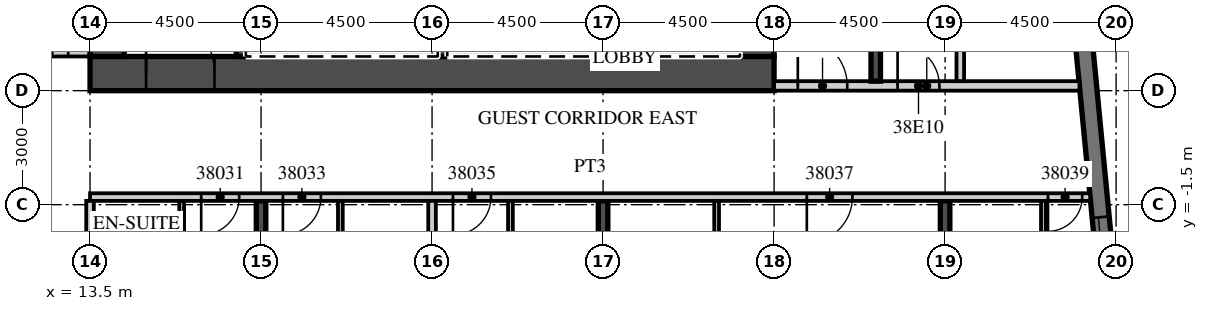
"""IFC4 building model, lengths in metres.
Left out: names, types, materials, properties, quantities, classifications, styles, units other than length and angle.
Written with IfcOpenShell. Run it as: python <this file> out.ifc"""

import sys

from ifc_helpers import new_model, si_unit, direction, frame, frame_2d, origin, place, context, subcontext, project, spatial, rectangle, extrude, element, fill, save


model = new_model("IFC4")
c1 = context("Model", 3, precision=1e-05, world=origin(), true_north=direction((0.0, 1.0)))
c2 = subcontext(c1, "Body", "Model", "MODEL_VIEW")
j1 = project(units=[si_unit("LENGTHUNIT", "METRE"), si_unit("PLANEANGLEUNIT", "RADIAN")], contexts=[c1])
p1 = place(None, origin())
s1 = spatial("IfcSite", under=j1, at=p1, CompositionType="ELEMENT")
p2 = place(p1, origin())
s2 = spatial("IfcBuilding", under=s1, at=p2, CompositionType="ELEMENT")
p3 = place(p2, frame((0.0, 0.0, 166.9)))
s3 = spatial("IfcBuildingStorey", under=s2, at=p3, CompositionType="ELEMENT", Elevation=166.9)
p4 = place(p3, frame((18.0, -19.245, 0.0), z_axis=(0.0, 0.0, 1.0), x_axis=(0.0, 1.0, 0.0)))
e1 = element("IfcWall", 1, at=p4, inside=s3, PredefinedType="SHEAR", context=c2, shape_type="SweptSolid", body=[
    extrude(rectangle(XDim=17.845, YDim=0.25, at=frame_2d((8.923, 0.0))), origin(), (0.0, 0.0, 1.0), 3.3),
])
p5 = place(p3, frame((27.0, -18.379, 0.0), z_axis=(0.0, 0.0, 1.0), x_axis=(0.0, 1.0, 0.0)))
e2 = element("IfcWall", 2, at=p5, inside=s3, PredefinedType="SHEAR", context=c2, shape_type="SweptSolid", body=[
    extrude(rectangle(XDim=16.979, YDim=0.25, at=frame_2d((8.489, 0.0))), origin(), (0.0, 0.0, 1.0), 3.3),
])
p6 = place(p3, frame((36.0, -17.512, 0.0), z_axis=(0.0, 0.0, 1.0), x_axis=(0.0, 1.0, 0.0)))
e3 = element("IfcWall", 3, at=p6, inside=s3, PredefinedType="SHEAR", context=c2, shape_type="SweptSolid", body=[
    extrude(rectangle(XDim=16.112, YDim=0.25, at=frame_2d((8.056, 0.0))), origin(), (0.0, 0.0, 1.0), 3.3),
])
p7 = place(p3, frame((41.214, -13.466, 0.0), z_axis=(0.0, 0.0, 1.0), x_axis=(-0.095847314626, 0.995396047952, 0.0)))
e4 = element("IfcWall", 4, at=p7, inside=s3, PredefinedType="SOLIDWALL", context=c2, shape_type="SweptSolid", body=[
    extrude(rectangle(XDim=34.0, YDim=0.45, at=frame_2d((17.0, 0.0))), origin(), (0.0, 0.0, 1.0), 3.02),
])
p8 = place(p7, frame((3.869, 0.0, 0.45)))
e5 = element("IfcOpeningElement", 5, at=p8, cuts=e4, PredefinedType="OPENING", context=c2, shape_type="SweptSolid", body=[
    extrude(rectangle(XDim=3.3, YDim=2.25, at=frame_2d((1.65, 1.125))), frame((0.0, 0.235, 0.0), z_axis=(0.0, -1.0, 0.0), x_axis=(1.0, 0.0, 0.0)), (0.0, 0.0, 1.0), 0.47),
])
p9 = place(p7, frame((8.39, 0.0, 0.45)))
e6 = element("IfcOpeningElement", 6, at=p9, cuts=e4, PredefinedType="OPENING", context=c2, shape_type="SweptSolid", body=[
    extrude(rectangle(XDim=3.3, YDim=2.25, at=frame_2d((1.65, 1.125))), frame((0.0, 0.235, 0.0), z_axis=(0.0, -1.0, 0.0), x_axis=(1.0, 0.0, 0.0)), (0.0, 0.0, 1.0), 0.47),
])
p10 = place(p3, frame((-13.5, 2.5, 0.0), z_axis=(0.0, 0.0, 1.0), x_axis=(1.0, 0.0, 0.0)))
e7 = element("IfcWall", 7, at=p10, inside=s3, PredefinedType="PARTITIONING", context=c2, shape_type="SweptSolid", body=[
    extrude(rectangle(XDim=27.0, YDim=0.2, at=frame_2d((13.5, 0.0))), origin(), (0.0, 0.0, 1.0), 3.02),
])
p11 = place(p10, frame((0.575, 0.0, 0.0)))
e8 = element("IfcOpeningElement", 8, at=p11, cuts=e7, PredefinedType="OPENING", context=c2, shape_type="SweptSolid", body=[
    extrude(rectangle(XDim=1.0, YDim=2.1, at=frame_2d((0.5, 1.05))), frame((0.0, 0.11, 0.0), z_axis=(0.0, -1.0, 0.0), x_axis=(1.0, 0.0, 0.0)), (0.0, 0.0, 1.0), 0.22),
])
p12 = place(p10, frame((7.45, 0.0, 0.0)))
e9 = element("IfcOpeningElement", 9, at=p12, cuts=e7, PredefinedType="OPENING", context=c2, shape_type="SweptSolid", body=[
    extrude(rectangle(XDim=1.0, YDim=2.1, at=frame_2d((0.5, 1.05))), frame((0.0, 0.11, 0.0), z_axis=(0.0, -1.0, 0.0), x_axis=(1.0, 0.0, 0.0)), (0.0, 0.0, 1.0), 0.22),
])
p13 = place(p10, frame((11.925, 0.0, 0.0)))
e10 = element("IfcOpeningElement", 10, at=p13, cuts=e7, PredefinedType="OPENING", context=c2, shape_type="SweptSolid", body=[
    extrude(rectangle(XDim=1.0, YDim=2.1, at=frame_2d((0.5, 1.05))), frame((0.0, 0.11, 0.0), z_axis=(0.0, -1.0, 0.0), x_axis=(1.0, 0.0, 0.0)), (0.0, 0.0, 1.0), 0.22),
])
p14 = place(p10, frame((15.938, 0.0, 0.0)))
e11 = element("IfcOpeningElement", 11, at=p14, cuts=e7, PredefinedType="OPENING", context=c2, shape_type="SweptSolid", body=[
    extrude(rectangle(XDim=1.2, YDim=2.1, at=frame_2d((0.6, 1.05))), frame((0.0, 0.11, 0.0), z_axis=(0.0, -1.0, 0.0), x_axis=(1.0, 0.0, 0.0)), (0.0, 0.0, 1.0), 0.22),
])
p15 = place(p10, frame((25.425, 0.0, 0.0)))
e12 = element("IfcOpeningElement", 12, at=p15, cuts=e7, PredefinedType="OPENING", context=c2, shape_type="SweptSolid", body=[
    extrude(rectangle(XDim=1.0, YDim=2.1, at=frame_2d((0.5, 1.05))), frame((0.0, 0.11, 0.0), z_axis=(0.0, -1.0, 0.0), x_axis=(1.0, 0.0, 0.0)), (0.0, 0.0, 1.0), 0.22),
])
p16 = place(p3, frame((13.5, -1.3, 0.0), z_axis=(0.0, 0.0, 1.0), x_axis=(1.0, 0.0, 0.0)))
e13 = element("IfcWall", 13, at=p16, inside=s3, PredefinedType="PARTITIONING", context=c2, shape_type="SweptSolid", body=[
    extrude(rectangle(XDim=26.317, YDim=0.2, at=frame_2d((13.158, 0.0))), origin(), (0.0, 0.0, 1.0), 3.02),
])
p17 = place(p16, frame((2.925, 0.0, 0.0)))
e14 = element("IfcOpeningElement", 14, at=p17, cuts=e13, PredefinedType="OPENING", context=c2, shape_type="SweptSolid", body=[
    extrude(rectangle(XDim=1.0, YDim=2.1, at=frame_2d((0.5, 1.05))), frame((0.0, 0.11, 0.0), z_axis=(0.0, -1.0, 0.0), x_axis=(1.0, 0.0, 0.0)), (0.0, 0.0, 1.0), 0.22),
])
p18 = place(p16, frame((5.075, 0.0, 0.0)))
e15 = element("IfcOpeningElement", 15, at=p18, cuts=e13, PredefinedType="OPENING", context=c2, shape_type="SweptSolid", body=[
    extrude(rectangle(XDim=1.0, YDim=2.1, at=frame_2d((0.5, 1.05))), frame((0.0, 0.11, 0.0), z_axis=(0.0, -1.0, 0.0), x_axis=(1.0, 0.0, 0.0)), (0.0, 0.0, 1.0), 0.22),
])
p19 = place(p16, frame((9.55, 0.0, 0.0)))
e16 = element("IfcOpeningElement", 16, at=p19, cuts=e13, PredefinedType="OPENING", context=c2, shape_type="SweptSolid", body=[
    extrude(rectangle(XDim=1.0, YDim=2.1, at=frame_2d((0.5, 1.05))), frame((0.0, 0.11, 0.0), z_axis=(0.0, -1.0, 0.0), x_axis=(1.0, 0.0, 0.0)), (0.0, 0.0, 1.0), 0.22),
])
p20 = place(p16, frame((18.862, 0.0, 0.0)))
e17 = element("IfcOpeningElement", 17, at=p20, cuts=e13, PredefinedType="OPENING", context=c2, shape_type="SweptSolid", body=[
    extrude(rectangle(XDim=1.2, YDim=2.1, at=frame_2d((0.6, 1.05))), frame((0.0, 0.11, 0.0), z_axis=(0.0, -1.0, 0.0), x_axis=(1.0, 0.0, 0.0)), (0.0, 0.0, 1.0), 0.22),
])
p21 = place(p16, frame((25.208, 0.0, 0.0)))
e18 = element("IfcOpeningElement", 18, at=p21, cuts=e13, PredefinedType="OPENING", context=c2, shape_type="SweptSolid", body=[
    extrude(rectangle(XDim=0.9, YDim=2.1, at=frame_2d((0.45, 1.05))), frame((0.0, 0.11, 0.0), z_axis=(0.0, -1.0, 0.0), x_axis=(1.0, 0.0, 0.0)), (0.0, 0.0, 1.0), 0.22),
])
p22 = place(p3, frame((13.5, -19.701, 0.0), z_axis=(0.0, 0.0, 1.0), x_axis=(0.0, 1.0, 0.0)))
e19 = element("IfcWall", 19, at=p22, inside=s3, PredefinedType="PARTITIONING", context=c2, shape_type="SweptSolid", body=[
    extrude(rectangle(XDim=18.301, YDim=0.2, at=frame_2d((9.15, 0.0))), origin(), (0.0, 0.0, 1.0), 3.02),
])
p23 = place(p3, frame((15.912, -7.125, 0.0), z_axis=(0.0, 0.0, 1.0), x_axis=(0.0, 1.0, 0.0)))
e20 = element("IfcWall", 20, at=p23, inside=s3, PredefinedType="PARTITIONING", context=c2, shape_type="SweptSolid", body=[
    extrude(rectangle(XDim=5.725, YDim=0.125, at=frame_2d((2.863, 0.0))), origin(), (0.0, 0.0, 1.0), 3.02),
])
p24 = place(p23, frame((2.375, 0.0, 0.0)))
e21 = element("IfcOpeningElement", 21, at=p24, cuts=e20, PredefinedType="OPENING", context=c2, shape_type="SweptSolid", body=[
    extrude(rectangle(XDim=0.9, YDim=2.1, at=frame_2d((0.45, 1.05))), frame((0.0, 0.073, 0.0), z_axis=(0.0, -1.0, 0.0), x_axis=(1.0, 0.0, 0.0)), (0.0, 0.0, 1.0), 0.145),
])
p25 = place(p3, frame((22.5, -18.834, 0.0), z_axis=(0.0, 0.0, 1.0), x_axis=(0.0, 1.0, 0.0)))
e22 = element("IfcWall", 22, at=p25, inside=s3, PredefinedType="PARTITIONING", context=c2, shape_type="SweptSolid", body=[
    extrude(rectangle(XDim=17.434, YDim=0.2, at=frame_2d((8.717, 0.0))), origin(), (0.0, 0.0, 1.0), 3.02),
])
p26 = place(p3, frame((20.087, -7.125, 0.0), z_axis=(0.0, 0.0, 1.0), x_axis=(0.0, 1.0, 0.0)))
e23 = element("IfcWall", 23, at=p26, inside=s3, PredefinedType="PARTITIONING", context=c2, shape_type="SweptSolid", body=[
    extrude(rectangle(XDim=5.725, YDim=0.125, at=frame_2d((2.863, 0.0))), origin(), (0.0, 0.0, 1.0), 3.02),
])
p27 = place(p26, frame((2.375, 0.0, 0.0)))
e24 = element("IfcOpeningElement", 24, at=p27, cuts=e23, PredefinedType="OPENING", context=c2, shape_type="SweptSolid", body=[
    extrude(rectangle(XDim=0.9, YDim=2.1, at=frame_2d((0.45, 1.05))), frame((0.0, 0.073, 0.0), z_axis=(0.0, -1.0, 0.0), x_axis=(1.0, 0.0, 0.0)), (0.0, 0.0, 1.0), 0.145),
])
p28 = place(p3, frame((24.562, -7.125, 0.0), z_axis=(0.0, 0.0, 1.0), x_axis=(0.0, 1.0, 0.0)))
e25 = element("IfcWall", 25, at=p28, inside=s3, PredefinedType="PARTITIONING", context=c2, shape_type="SweptSolid", body=[
    extrude(rectangle(XDim=5.725, YDim=0.125, at=frame_2d((2.863, 0.0))), origin(), (0.0, 0.0, 1.0), 3.02),
])
p29 = place(p28, frame((2.375, 0.0, 0.0)))
e26 = element("IfcOpeningElement", 26, at=p29, cuts=e25, PredefinedType="OPENING", context=c2, shape_type="SweptSolid", body=[
    extrude(rectangle(XDim=0.9, YDim=2.1, at=frame_2d((0.45, 1.05))), frame((0.0, 0.073, 0.0), z_axis=(0.0, -1.0, 0.0), x_axis=(1.0, 0.0, 0.0)), (0.0, 0.0, 1.0), 0.145),
])
p30 = place(p3, frame((29.988, -7.125, 0.0), z_axis=(0.0, 0.0, 1.0), x_axis=(0.0, 1.0, 0.0)))
e27 = element("IfcWall", 27, at=p30, inside=s3, PredefinedType="PARTITIONING", context=c2, shape_type="SweptSolid", body=[
    extrude(rectangle(XDim=5.725, YDim=0.125, at=frame_2d((2.863, 0.0))), origin(), (0.0, 0.0, 1.0), 3.02),
])
p31 = place(p30, frame((2.375, 0.0, 0.0)))
e28 = element("IfcOpeningElement", 28, at=p31, cuts=e27, PredefinedType="OPENING", context=c2, shape_type="SweptSolid", body=[
    extrude(rectangle(XDim=0.9, YDim=2.1, at=frame_2d((0.45, 1.05))), frame((0.0, 0.073, 0.0), z_axis=(0.0, -1.0, 0.0), x_axis=(1.0, 0.0, 0.0)), (0.0, 0.0, 1.0), 0.145),
])
p32 = place(p3, frame((38.587, -6.445, 0.0), z_axis=(0.0, 0.0, 1.0), x_axis=(0.0, 1.0, 0.0)))
e29 = element("IfcWall", 29, at=p32, inside=s3, PredefinedType="PARTITIONING", context=c2, shape_type="SweptSolid", body=[
    extrude(rectangle(XDim=5.045, YDim=0.125, at=frame_2d((2.522, 0.0))), origin(), (0.0, 0.0, 1.0), 3.02),
])
p33 = place(p32, frame((1.695, 0.0, 0.0)))
e30 = element("IfcOpeningElement", 30, at=p33, cuts=e29, PredefinedType="OPENING", context=c2, shape_type="SweptSolid", body=[
    extrude(rectangle(XDim=0.9, YDim=2.1, at=frame_2d((0.45, 1.05))), frame((0.0, 0.073, 0.0), z_axis=(0.0, -1.0, 0.0), x_axis=(1.0, 0.0, 0.0)), (0.0, 0.0, 1.0), 0.145),
])
p34 = place(p3, frame((13.5, 1.95, 0.0), z_axis=(0.0, 0.0, 1.0), x_axis=(1.0, 0.0, 0.0)))
e31 = element("IfcWall", 31, at=p34, inside=s3, PredefinedType="SHEAR", context=c2, shape_type="SweptSolid", body=[
    extrude(rectangle(XDim=18.0, YDim=0.9, at=frame_2d((9.0, 0.0))), origin(), (0.0, 0.0, 1.0), 3.02),
])
p35 = place(p34, frame((1.475, 0.0, 0.0)))
e32 = element("IfcOpeningElement", 32, at=p35, cuts=e31, PredefinedType="OPENING", context=c2, shape_type="SweptSolid", body=[
    extrude(rectangle(XDim=1.8, YDim=2.1, at=frame_2d((0.9, 1.05))), frame((0.0, 0.46, 0.0), z_axis=(0.0, -1.0, 0.0), x_axis=(1.0, 0.0, 0.0)), (0.0, 0.0, 1.0), 0.92),
])
p36 = place(p3, frame((31.05, 2.4, 0.0), z_axis=(0.0, 0.0, 1.0), x_axis=(0.0, 1.0, 0.0)))
e33 = element("IfcWall", 33, at=p36, inside=s3, PredefinedType="SHEAR", context=c2, shape_type="SweptSolid", body=[
    extrude(rectangle(XDim=12.8, YDim=0.9, at=frame_2d((6.4, 0.0))), origin(), (0.0, 0.0, 1.0), 3.02),
])
p37 = place(p36, frame((0.2, 0.0, 0.0)))
e34 = element("IfcOpeningElement", 34, at=p37, cuts=e33, PredefinedType="OPENING", context=c2, shape_type="SweptSolid", body=[
    extrude(rectangle(XDim=1.1, YDim=2.1, at=frame_2d((0.55, 1.05))), frame((0.0, 0.46, 0.0), z_axis=(0.0, -1.0, 0.0), x_axis=(1.0, 0.0, 0.0)), (0.0, 0.0, 1.0), 0.92),
])
p38 = place(p3, frame((13.95, 2.4, 0.0), z_axis=(0.0, 0.0, 1.0), x_axis=(0.0, 1.0, 0.0)))
e35 = element("IfcWall", 35, at=p38, inside=s3, PredefinedType="SHEAR", context=c2, shape_type="SweptSolid", body=[
    extrude(rectangle(XDim=12.2, YDim=0.9, at=frame_2d((6.1, 0.0))), origin(), (0.0, 0.0, 1.0), 3.02),
])
p39 = place(p3, frame((17.475, 2.4, 0.0), z_axis=(0.0, 0.0, 1.0), x_axis=(0.0, 1.0, 0.0)))
e36 = element("IfcWall", 36, at=p39, inside=s3, PredefinedType="SHEAR", context=c2, shape_type="SweptSolid", body=[
    extrude(rectangle(XDim=3.15, YDim=0.25, at=frame_2d((1.575, 0.0))), origin(), (0.0, 0.0, 1.0), 3.02),
])
for number, where, z_axis, x_axis in (
    (37, (27.975, 2.4, 0.0), (0.0, 0.0, 1.0), (0.0, 1.0, 0.0)),
    (38, (22.775, 2.4, 0.0), (0.0, 0.0, 1.0), (0.0, 1.0, 0.0)),
):
    element("IfcWall", number, at=place(p3, frame(where, z_axis=z_axis, x_axis=x_axis)), inside=s3, PredefinedType="SHEAR", context=c2, shape_type="SweptSolid", body=[
        extrude(rectangle(XDim=2.9, YDim=0.25, at=frame_2d((1.45, 0.0))), origin(), (0.0, 0.0, 1.0), 3.02),
    ])
p40 = place(p3, frame((31.5, 1.625, 0.0), z_axis=(0.0, 0.0, 1.0), x_axis=(1.0, 0.0, 0.0)))
e39 = element("IfcWall", 39, at=p40, inside=s3, PredefinedType="PARTITIONING", context=c2, shape_type="SweptSolid", body=[
    extrude(rectangle(XDim=8.035, YDim=0.25, at=frame_2d((4.018, 0.0))), origin(), (0.0, 0.0, 1.0), 3.02),
])
p41 = place(p40, frame((0.625, 0.0, 0.0)))
e40 = element("IfcOpeningElement", 40, at=p41, cuts=e39, PredefinedType="OPENING", context=c2, shape_type="SweptSolid", body=[
    extrude(rectangle(XDim=1.3, YDim=2.1, at=frame_2d((0.65, 1.05))), frame((0.0, 0.135, 0.0), z_axis=(0.0, -1.0, 0.0), x_axis=(1.0, 0.0, 0.0)), (0.0, 0.0, 1.0), 0.27),
])
p42 = place(p40, frame((3.25, 0.0, 0.0)))
e41 = element("IfcOpeningElement", 41, at=p42, cuts=e39, PredefinedType="OPENING", context=c2, shape_type="SweptSolid", body=[
    extrude(rectangle(XDim=1.1, YDim=2.1, at=frame_2d((0.55, 1.05))), frame((0.0, 0.135, 0.0), z_axis=(0.0, -1.0, 0.0), x_axis=(1.0, 0.0, 0.0)), (0.0, 0.0, 1.0), 0.27),
])
p43 = place(p3, frame((34.175, 1.75, 0.0), z_axis=(0.0, 0.0, 1.0), x_axis=(0.0, 1.0, 0.0)))
e42 = element("IfcWall", 42, at=p43, inside=s3, PredefinedType="SHEAR", context=c2, shape_type="SweptSolid", body=[
    extrude(rectangle(XDim=8.35, YDim=0.25, at=frame_2d((4.175, 0.0))), origin(), (0.0, 0.0, 1.0), 3.02),
])
p44 = place(p3, frame((36.4, 1.75, 0.0), z_axis=(0.0, 0.0, 1.0), x_axis=(0.0, 1.0, 0.0)))
e43 = element("IfcWall", 43, at=p44, inside=s3, PredefinedType="PARTITIONING", context=c2, shape_type="SweptSolid", body=[
    extrude(rectangle(XDim=15.95, YDim=0.2, at=frame_2d((7.975, 0.0))), origin(), (0.0, 0.0, 1.0), 3.02),
])
p45 = place(p44, frame((14.7, 0.0, 0.0)))
e44 = element("IfcOpeningElement", 44, at=p45, cuts=e43, PredefinedType="OPENING", context=c2, shape_type="SweptSolid", body=[
    extrude(rectangle(XDim=0.9, YDim=2.1, at=frame_2d((0.45, 1.05))), frame((0.0, 0.11, 0.0), z_axis=(0.0, -1.0, 0.0), x_axis=(1.0, 0.0, 0.0)), (0.0, 0.0, 1.0), 0.22),
])
p46 = place(p9, origin())
e45 = element("IfcWindow", 45, at=p46, inside=s3, PartitioningType="SINGLE_PANEL", PredefinedType="WINDOW", context=c2, shape_type="SweptSolid", body=[
    extrude(rectangle(XDim=3.3, YDim=2.25, at=frame_2d((1.65, 1.125))), frame((0.0, 0.09, 0.0), z_axis=(0.0, -1.0, 0.0), x_axis=(1.0, 0.0, 0.0)), (0.0, 0.0, 1.0), 0.06),
])
fill(e6, e45)
p47 = place(p15, origin())
e46 = element("IfcDoor", 46, at=p47, inside=s3, OperationType="SINGLE_SWING_LEFT", PredefinedType="DOOR", context=c2, shape_type="SweptSolid", body=[
    extrude(rectangle(XDim=1.0, YDim=2.1, at=frame_2d((0.5, 1.05))), frame((0.0, 0.025, 0.0), z_axis=(0.0, -1.0, 0.0), x_axis=(1.0, 0.0, 0.0)), (0.0, 0.0, 1.0), 0.05),
])
fill(e12, e46)
p48 = place(p17, origin())
e47 = element("IfcDoor", 47, at=p48, inside=s3, OperationType="SINGLE_SWING_LEFT", PredefinedType="DOOR", context=c2, shape_type="SweptSolid", body=[
    extrude(rectangle(XDim=1.0, YDim=2.1, at=frame_2d((0.5, 1.05))), frame((0.0, 0.025, 0.0), z_axis=(0.0, -1.0, 0.0), x_axis=(1.0, 0.0, 0.0)), (0.0, 0.0, 1.0), 0.05),
])
fill(e14, e47)
p49 = place(p18, origin())
e48 = element("IfcDoor", 48, at=p49, inside=s3, OperationType="SINGLE_SWING_LEFT", PredefinedType="DOOR", context=c2, shape_type="SweptSolid", body=[
    extrude(rectangle(XDim=1.0, YDim=2.1, at=frame_2d((0.5, 1.05))), frame((0.0, 0.025, 0.0), z_axis=(0.0, -1.0, 0.0), x_axis=(1.0, 0.0, 0.0)), (0.0, 0.0, 1.0), 0.05),
])
fill(e15, e48)
p50 = place(p19, origin())
e49 = element("IfcDoor", 49, at=p50, inside=s3, OperationType="SINGLE_SWING_LEFT", PredefinedType="DOOR", context=c2, shape_type="SweptSolid", body=[
    extrude(rectangle(XDim=1.0, YDim=2.1, at=frame_2d((0.5, 1.05))), frame((0.0, 0.025, 0.0), z_axis=(0.0, -1.0, 0.0), x_axis=(1.0, 0.0, 0.0)), (0.0, 0.0, 1.0), 0.05),
])
fill(e16, e49)
p51 = place(p20, origin())
e50 = element("IfcDoor", 50, at=p51, inside=s3, OperationType="SINGLE_SWING_LEFT", PredefinedType="DOOR", context=c2, shape_type="SweptSolid", body=[
    extrude(rectangle(XDim=1.2, YDim=2.1, at=frame_2d((0.6, 1.05))), frame((0.0, 0.025, 0.0), z_axis=(0.0, -1.0, 0.0), x_axis=(1.0, 0.0, 0.0)), (0.0, 0.0, 1.0), 0.05),
])
fill(e17, e50)
p52 = place(p21, origin())
e51 = element("IfcDoor", 51, at=p52, inside=s3, OperationType="SINGLE_SWING_LEFT", PredefinedType="DOOR", context=c2, shape_type="SweptSolid", body=[
    extrude(rectangle(XDim=0.9, YDim=2.1, at=frame_2d((0.45, 1.05))), frame((0.0, 0.025, 0.0), z_axis=(0.0, -1.0, 0.0), x_axis=(1.0, 0.0, 0.0)), (0.0, 0.0, 1.0), 0.05),
])
fill(e18, e51)
p53 = place(p35, origin())
e52 = element("IfcDoor", 52, at=p53, inside=s3, OperationType="DOUBLE_DOOR_DOUBLE_SWING", PredefinedType="DOOR", context=c2, shape_type="SweptSolid", body=[
    extrude(rectangle(XDim=1.8, YDim=2.1, at=frame_2d((0.9, 1.05))), frame((0.0, 0.025, 0.0), z_axis=(0.0, -1.0, 0.0), x_axis=(1.0, 0.0, 0.0)), (0.0, 0.0, 1.0), 0.05),
])
fill(e32, e52)
p54 = place(p41, origin())
e53 = element("IfcDoor", 53, at=p54, inside=s3, OperationType="SINGLE_SWING_LEFT", PredefinedType="DOOR", context=c2, shape_type="SweptSolid", body=[
    extrude(rectangle(XDim=1.3, YDim=2.1, at=frame_2d((0.65, 1.05))), frame((0.0, 0.025, 0.0), z_axis=(0.0, -1.0, 0.0), x_axis=(1.0, 0.0, 0.0)), (0.0, 0.0, 1.0), 0.05),
])
fill(e40, e53)
p55 = place(p42, origin())
e54 = element("IfcDoor", 54, at=p55, inside=s3, OperationType="SINGLE_SWING_LEFT", PredefinedType="DOOR", context=c2, shape_type="SweptSolid", body=[
    extrude(rectangle(XDim=1.1, YDim=2.1, at=frame_2d((0.55, 1.05))), frame((0.0, 0.025, 0.0), z_axis=(0.0, -1.0, 0.0), x_axis=(1.0, 0.0, 0.0)), (0.0, 0.0, 1.0), 0.05),
])
fill(e41, e54)
save(model, sys.argv[1])
